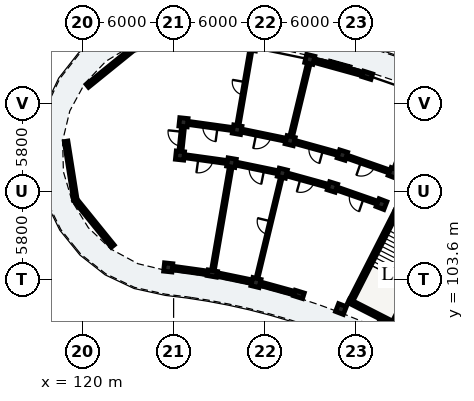
"""IFC4 building model, lengths in metres.
Left out: names, types, materials, properties, quantities, classifications, styles, units other than length and angle.
Written with IfcOpenShell. Run it as: python <this file> out.ifc"""

import sys

from ifc_helpers import new_model, si_unit, direction, frame, frame_2d, origin, origin_2d, place, context, subcontext, project, spatial, rectangle, extrude, element, fill, save


model = new_model("IFC4")
c1 = context("Model", 3, precision=1e-05, world=origin(), true_north=direction((0.0, 1.0)))
c2 = subcontext(c1, "Body", "Model", "MODEL_VIEW")
j1 = project(units=[si_unit("LENGTHUNIT", "METRE"), si_unit("PLANEANGLEUNIT", "RADIAN")], contexts=[c1])
p1 = place(None, origin())
s1 = spatial("IfcSite", under=j1, at=p1, CompositionType="ELEMENT")
p2 = place(p1, origin())
s2 = spatial("IfcBuilding", under=s1, at=p2, CompositionType="ELEMENT")
p3 = place(p2, frame((0.0, 0.0, 12.2)))
s3 = spatial("IfcBuildingStorey", under=s2, at=p3, CompositionType="ELEMENT", Elevation=12.2)
p4 = place(p3, frame((140.684, 108.139, 0.0), z_axis=(0.0, 0.0, 1.0), x_axis=(-0.453992276384, -0.891005618941, 0.0)))
e1 = element("IfcWall", 1, at=p4, inside=s3, PredefinedType="SHEAR", context=c2, shape_type="SweptSolid", body=[
    extrude(rectangle(XDim=6.6, YDim=0.25, at=frame_2d((3.3, 0.0))), origin(), (0.0, 0.0, 1.0), 3.11),
])
p5 = place(p3, frame((137.52, 102.203, 0.0), z_axis=(0.0, 0.0, 1.0), x_axis=(0.891003540237, -0.453996356025, 0.0)))
e2 = element("IfcWall", 2, at=p5, inside=s3, PredefinedType="SHEAR", context=c2, shape_type="SweptSolid", body=[
    extrude(rectangle(XDim=3.42, YDim=0.25, at=frame_2d((1.71, 0.0))), origin(), (0.0, 0.0, 1.0), 3.11),
])
p6 = place(p3, frame((143.509, 106.699, 0.0), z_axis=(0.0, 0.0, 1.0), x_axis=(-0.453992276384, -0.891005618941, 0.0)))
e3 = element("IfcWall", 3, at=p6, inside=s3, PredefinedType="SHEAR", context=c2, shape_type="SweptSolid", body=[
    extrude(rectangle(XDim=6.6, YDim=0.25, at=frame_2d((3.3, 0.0))), origin(), (0.0, 0.0, 1.0), 3.11),
])
p7 = place(p6, frame((0.22, 0.0, 0.0)))
e4 = element("IfcOpeningElement", 4, at=p7, cuts=e3, PredefinedType="OPENING", context=c2, shape_type="SweptSolid", body=[
    extrude(rectangle(XDim=1.05, YDim=2.15, at=frame_2d((0.525, 1.075))), frame((0.0, 0.135, 0.0), z_axis=(0.0, -1.0, 0.0), x_axis=(1.0, 0.0, 0.0)), (0.0, 0.0, 1.0), 0.27),
])
for number, where, z_axis, x_axis in (
    (5, (137.01, 101.667, 0.0), (0.0, 0.0, 1.0), (0.36, 0.933, 0.0)),
    (6, (139.675, 108.57, 0.0), (0.0, 0.0, 1.0), (0.36, 0.933, 0.0)),
    (7, (140.468, 110.622, 0.0), (0.0, 0.0, 1.0), (0.36, 0.933, 0.0)),
):
    element("IfcColumn", number, at=place(p3, frame(where, z_axis=z_axis, x_axis=x_axis)), inside=s3, PredefinedType="COLUMN", context=c2, shape_type="SweptSolid", body=[
        extrude(rectangle(XDim=0.55, YDim=0.55, at=origin_2d()), origin(), (0.0, 0.0, 1.0), 3.105),
    ])
p8 = place(p3, frame((134.243, 102.631, 0.0), z_axis=(0.0, 0.0, 1.0), x_axis=(0.297930225503, 0.954587649581, 0.0)))
e8 = element("IfcColumn", 8, at=p8, inside=s3, PredefinedType="PILASTER", context=c2, shape_type="SweptSolid", body=[
    extrude(rectangle(XDim=0.38, YDim=0.62, at=origin_2d()), origin(), (0.0, 0.0, 1.0), 3.105),
])
for number, where, z_axis, x_axis in (
    (9, (136.448, 109.695, 0.0), (0.0, 0.0, 1.0), (0.298, 0.955, 0.0)),
    (10, (137.103, 111.795, 0.0), (0.0, 0.0, 1.0), (0.298, 0.955, 0.0)),
):
    element("IfcColumn", number, at=place(p3, frame(where, z_axis=z_axis, x_axis=x_axis)), inside=s3, PredefinedType="COLUMN", context=c2, shape_type="SweptSolid", body=[
        extrude(rectangle(XDim=0.55, YDim=0.55, at=origin_2d()), origin(), (0.0, 0.0, 1.0), 3.105),
    ])
p9 = place(p3, frame((138.742, 117.046, 0.0), z_axis=(0.0, 0.0, 1.0), x_axis=(0.297930225503, 0.954587649581, 0.0)))
e11 = element("IfcColumn", 11, at=p9, inside=s3, PredefinedType="PILASTER", context=c2, shape_type="SweptSolid", body=[
    extrude(rectangle(XDim=0.38, YDim=0.62, at=origin_2d()), origin(), (0.0, 0.0, 1.0), 3.105),
])
for number, where, z_axis, x_axis in (
    (12, (131.418, 103.412, 0.0), (0.0, 0.0, 1.0), (0.234, 0.972, 0.0)),
    (13, (133.153, 110.606, 0.0), (0.0, 0.0, 1.0), (0.234, 0.972, 0.0)),
    (14, (133.669, 112.744, 0.0), (0.0, 0.0, 1.0), (0.234, 0.972, 0.0)),
    (15, (134.958, 118.091, 0.0), (0.0, 0.0, 1.0), (0.234, 0.972, 0.0)),
):
    element("IfcColumn", number, at=place(p3, frame(where, z_axis=z_axis, x_axis=x_axis)), inside=s3, PredefinedType="COLUMN", context=c2, shape_type="SweptSolid", body=[
        extrude(rectangle(XDim=0.55, YDim=0.55, at=origin_2d()), origin(), (0.0, 0.0, 1.0), 3.105),
    ])
p10 = place(p3, frame((128.549, 104.004, 0.0), z_axis=(0.0, 0.0, 1.0), x_axis=(0.169827230012, 0.985473851478, 0.0)))
e16 = element("IfcColumn", 16, at=p10, inside=s3, PredefinedType="PILASTER", context=c2, shape_type="SweptSolid", body=[
    extrude(rectangle(XDim=0.38, YDim=0.62, at=origin_2d()), origin(), (0.0, 0.0, 1.0), 3.105),
])
for number, where, z_axis, x_axis in (
    (17, (129.806, 111.297, 0.0), (0.0, 0.0, 1.0), (0.17, 0.985, 0.0)),
    (18, (130.179, 113.465, 0.0), (0.0, 0.0, 1.0), (0.17, 0.985, 0.0)),
    (19, (125.646, 104.406, 0.0), (0.0, 0.0, 1.0), (0.105, 0.995, 0.0)),
    (20, (126.42, 111.766, 0.0), (0.0, 0.0, 1.0), (0.105, 0.995, 0.0)),
    (21, (126.65, 113.954, 0.0), (0.0, 0.0, 1.0), (0.105, 0.995, 0.0)),
):
    element("IfcColumn", number, at=place(p3, frame(where, z_axis=z_axis, x_axis=x_axis)), inside=s3, PredefinedType="COLUMN", context=c2, shape_type="SweptSolid", body=[
        extrude(rectangle(XDim=0.55, YDim=0.55, at=origin_2d()), origin(), (0.0, 0.0, 1.0), 3.105),
    ])
p11 = place(p3, frame((138.587, 117.088, 0.0), z_axis=(0.0, 0.0, 1.0), x_axis=(-0.963894473631, 0.266284516456, 0.0)))
e22 = element("IfcWall", 22, at=p11, inside=s3, PredefinedType="SOLIDWALL", context=c2, shape_type="SweptSolid", body=[
    extrude(rectangle(XDim=3.521, YDim=0.24, at=frame_2d((1.76, 0.0))), origin(), (0.0, 0.0, 1.0), 2.355),
])
p12 = place(p11, frame((1.07, 0.0, 0.55)))
e23 = element("IfcOpeningElement", 23, at=p12, cuts=e22, PredefinedType="OPENING", context=c2, shape_type="SweptSolid", body=[
    extrude(rectangle(XDim=1.38, YDim=1.56, at=frame_2d((0.69, 0.78))), frame((0.0, 0.13, 0.0), z_axis=(0.0, -1.0, 0.0), x_axis=(1.0, 0.0, 0.0)), (0.0, 0.0, 1.0), 0.26),
])
p13 = place(p3, frame((134.089, 102.674, 0.0), z_axis=(0.0, 0.0, 1.0), x_axis=(-0.963901971286, 0.266257375017, 0.0)))
e24 = element("IfcWall", 24, at=p13, inside=s3, PredefinedType="SOLIDWALL", context=c2, shape_type="SweptSolid", body=[
    extrude(rectangle(XDim=2.525, YDim=0.24, at=frame_2d((1.263, 0.0))), origin(), (0.0, 0.0, 1.0), 2.355),
])
p14 = place(p13, frame((0.603, 0.0, 0.55)))
e25 = element("IfcOpeningElement", 25, at=p14, cuts=e24, PredefinedType="OPENING", context=c2, shape_type="SweptSolid", body=[
    extrude(rectangle(XDim=1.32, YDim=1.585, at=frame_2d((0.66, 0.792))), frame((0.0, 0.13, 0.0), z_axis=(0.0, -1.0, 0.0), x_axis=(1.0, 0.0, 0.0)), (0.0, 0.0, 1.0), 0.26),
])
p15 = place(p3, frame((131.179, 103.461, 0.0), z_axis=(0.0, 0.0, 1.0), x_axis=(-0.979353576928, 0.202154820272, 0.0)))
e26 = element("IfcWall", 26, at=p15, inside=s3, PredefinedType="SOLIDWALL", context=c2, shape_type="SweptSolid", body=[
    extrude(rectangle(XDim=2.525, YDim=0.24, at=frame_2d((1.263, 0.0))), origin(), (0.0, 0.0, 1.0), 2.355),
])
p16 = place(p15, frame((0.542, 0.0, 0.35)))
e27 = element("IfcOpeningElement", 27, at=p16, cuts=e26, PredefinedType="OPENING", context=c2, shape_type="SweptSolid", body=[
    extrude(rectangle(XDim=1.44, YDim=1.66, at=frame_2d((0.72, 0.83))), frame((0.0, 0.13, 0.0), z_axis=(0.0, -1.0, 0.0), x_axis=(1.0, 0.0, 0.0)), (0.0, 0.0, 1.0), 0.26),
])
p17 = place(p3, frame((128.39, 104.026, 0.0), z_axis=(0.0, 0.0, 1.0), x_axis=(-0.990545622952, 0.13718370476, 0.0)))
e28 = element("IfcWall", 28, at=p17, inside=s3, PredefinedType="SOLIDWALL", context=c2, shape_type="SweptSolid", body=[
    extrude(rectangle(XDim=2.525, YDim=0.24, at=frame_2d((1.263, 0.0))), origin(), (0.0, 0.0, 1.0), 2.355),
])
p18 = place(p17, frame((0.483, 0.0, 0.55)))
e29 = element("IfcOpeningElement", 29, at=p18, cuts=e28, PredefinedType="OPENING", context=c2, shape_type="SweptSolid", body=[
    extrude(rectangle(XDim=1.56, YDim=1.51, at=frame_2d((0.78, 0.755))), frame((0.0, 0.13, 0.0), z_axis=(0.0, -1.0, 0.0), x_axis=(1.0, 0.0, 0.0)), (0.0, 0.0, 1.0), 0.26),
])
p19 = place(p3, frame((121.998, 105.807, 0.0), z_axis=(0.0, 0.0, 1.0), x_axis=(-0.629331205321, 0.777137204109, 0.0)))
e30 = element("IfcWall", 30, at=p19, inside=s3, PredefinedType="SOLIDWALL", context=c2, shape_type="SweptSolid", body=[
    extrude(rectangle(XDim=3.908, YDim=0.24, at=frame_2d((1.954, 0.0))), origin(), (0.0, 0.0, 1.0), 2.355),
])
p20 = place(p3, frame((119.538, 108.844, 0.0), z_axis=(0.0, 0.0, 1.0), x_axis=(-0.15648221771, 0.987680776132, 0.0)))
e31 = element("IfcWall", 31, at=p20, inside=s3, PredefinedType="SOLIDWALL", context=c2, shape_type="SweptSolid", body=[
    extrude(rectangle(XDim=3.908, YDim=0.24, at=frame_2d((1.954, 0.0))), origin(), (0.0, 0.0, 1.0), 2.355),
])
p21 = place(p20, frame((1.029, 0.0, 0.4)))
e32 = element("IfcOpeningElement", 32, at=p21, cuts=e31, PredefinedType="OPENING", context=c2, shape_type="SweptSolid", body=[
    extrude(rectangle(XDim=1.85, YDim=1.72, at=frame_2d((0.925, 0.86))), frame((0.0, 0.13, 0.0), z_axis=(0.0, -1.0, 0.0), x_axis=(1.0, 0.0, 0.0)), (0.0, 0.0, 1.0), 0.26),
])
p22 = place(p3, frame((120.327, 116.353, 0.0), z_axis=(0.0, 0.0, 1.0), x_axis=(0.777137204109, 0.629331205321, 0.0)))
e33 = element("IfcWall", 33, at=p22, inside=s3, PredefinedType="SOLIDWALL", context=c2, shape_type="SweptSolid", body=[
    extrude(rectangle(XDim=3.908, YDim=0.24, at=frame_2d((1.954, 0.0))), origin(), (0.0, 0.0, 1.0), 2.355),
])
p23 = place(p3, frame((140.612, 110.996, 0.0), z_axis=(0.0, 0.0, 1.0), x_axis=(0.360186633854, 0.932880264982, 0.0)))
e34 = element("IfcWall", 34, at=p23, inside=s3, PredefinedType="PARTITIONING", context=c2, shape_type="SweptSolid", body=[
    extrude(rectangle(XDim=4.7, YDim=0.185, at=frame_2d((2.35, 0.0))), origin(), (0.0, 0.0, 1.0), 2.37),
])
p24 = place(p3, frame((140.137, 110.738, 0.0), z_axis=(0.0, 0.0, 1.0), x_axis=(-0.944253820929, 0.329218349522, 0.0)))
e35 = element("IfcWall", 35, at=p24, inside=s3, PredefinedType="PARTITIONING", context=c2, shape_type="SweptSolid", body=[
    extrude(rectangle(XDim=2.863, YDim=0.205, at=frame_2d((1.432, 0.0))), origin(), (0.0, 0.0, 1.0), 2.37),
])
p25 = place(p24, frame((0.957, 0.0, 0.0)))
e36 = element("IfcOpeningElement", 36, at=p25, cuts=e35, PredefinedType="OPENING", context=c2, shape_type="SweptSolid", body=[
    extrude(rectangle(XDim=0.95, YDim=2.13, at=frame_2d((0.475, 1.065))), frame((0.0, 0.113, 0.0), z_axis=(0.0, -1.0, 0.0), x_axis=(1.0, 0.0, 0.0)), (0.0, 0.0, 1.0), 0.225),
])
p26 = place(p3, frame((139.345, 108.685, 0.0), z_axis=(0.0, 0.0, 1.0), x_axis=(-0.944265123647, 0.329185929627, 0.0)))
e37 = element("IfcWall", 37, at=p26, inside=s3, PredefinedType="PARTITIONING", context=c2, shape_type="SweptSolid", body=[
    extrude(rectangle(XDim=2.718, YDim=0.205, at=frame_2d((1.359, 0.0))), origin(), (0.0, 0.0, 1.0), 2.37),
])
p27 = place(p26, frame((0.884, 0.0, 0.0)))
e38 = element("IfcOpeningElement", 38, at=p27, cuts=e37, PredefinedType="OPENING", context=c2, shape_type="SweptSolid", body=[
    extrude(rectangle(XDim=0.95, YDim=2.13, at=frame_2d((0.475, 1.065))), frame((0.0, 0.113, 0.0), z_axis=(0.0, -1.0, 0.0), x_axis=(1.0, 0.0, 0.0)), (0.0, 0.0, 1.0), 0.225),
])
p28 = place(p3, frame((136.766, 111.889, 0.0), z_axis=(0.0, 0.0, 1.0), x_axis=(-0.963890789093, 0.266297853356, 0.0)))
e39 = element("IfcWall", 39, at=p28, inside=s3, PredefinedType="PARTITIONING", context=c2, shape_type="SweptSolid", body=[
    extrude(rectangle(XDim=2.863, YDim=0.205, at=frame_2d((1.432, 0.0))), origin(), (0.0, 0.0, 1.0), 2.37),
])
p29 = place(p28, frame((0.967, 0.0, 0.0)))
e40 = element("IfcOpeningElement", 40, at=p29, cuts=e39, PredefinedType="OPENING", context=c2, shape_type="SweptSolid", body=[
    extrude(rectangle(XDim=0.93, YDim=2.12, at=frame_2d((0.465, 1.06))), frame((0.0, 0.113, 0.0), z_axis=(0.0, -1.0, 0.0), x_axis=(1.0, 0.0, 0.0)), (0.0, 0.0, 1.0), 0.225),
])
p30 = place(p3, frame((136.11, 109.789, 0.0), z_axis=(0.0, 0.0, 1.0), x_axis=(-0.96388375821, 0.266323301006, 0.0)))
e41 = element("IfcWall", 41, at=p30, inside=s3, PredefinedType="PARTITIONING", context=c2, shape_type="SweptSolid", body=[
    extrude(rectangle(XDim=2.718, YDim=0.205, at=frame_2d((1.359, 0.0))), origin(), (0.0, 0.0, 1.0), 2.37),
])
p31 = place(p30, frame((0.894, 0.0, 0.0)))
e42 = element("IfcOpeningElement", 42, at=p31, cuts=e41, PredefinedType="OPENING", context=c2, shape_type="SweptSolid", body=[
    extrude(rectangle(XDim=0.93, YDim=2.12, at=frame_2d((0.465, 1.06))), frame((0.0, 0.113, 0.0), z_axis=(0.0, -1.0, 0.0), x_axis=(1.0, 0.0, 0.0)), (0.0, 0.0, 1.0), 0.225),
])
p32 = place(p3, frame((133.762, 113.133, 0.0), z_axis=(0.0, 0.0, 1.0), x_axis=(0.234386624934, 0.972143461662, 0.0)))
e43 = element("IfcWall", 43, at=p32, inside=s3, PredefinedType="PARTITIONING", context=c2, shape_type="SweptSolid", body=[
    extrude(rectangle(XDim=4.7, YDim=0.185, at=frame_2d((2.35, 0.0))), origin(), (0.0, 0.0, 1.0), 2.37),
])
p33 = place(p3, frame((131.512, 103.801, 0.0), z_axis=(0.0, 0.0, 1.0), x_axis=(0.234406698576, 0.972138621629, 0.0)))
e44 = element("IfcWall", 44, at=p33, inside=s3, PredefinedType="PARTITIONING", context=c2, shape_type="SweptSolid", body=[
    extrude(rectangle(XDim=6.6, YDim=0.125, at=frame_2d((3.3, 0.0))), origin(), (0.0, 0.0, 1.0), 2.37),
])
p34 = place(p33, frame((2.855, 0.0, 0.0)))
e45 = element("IfcOpeningElement", 45, at=p34, cuts=e44, PredefinedType="OPENING", context=c2, shape_type="SweptSolid", body=[
    extrude(rectangle(XDim=0.89, YDim=2.1, at=frame_2d((0.445, 1.05))), frame((0.0, 0.073, 0.0), z_axis=(0.0, -1.0, 0.0), x_axis=(1.0, 0.0, 0.0)), (0.0, 0.0, 1.0), 0.145),
])
p35 = place(p3, frame((133.326, 112.815, 0.0), z_axis=(0.0, 0.0, 1.0), x_axis=(-0.979348418612, 0.202179808492, 0.0)))
e46 = element("IfcWall", 46, at=p35, inside=s3, PredefinedType="PARTITIONING", context=c2, shape_type="SweptSolid", body=[
    extrude(rectangle(XDim=2.863, YDim=0.205, at=frame_2d((1.432, 0.0))), origin(), (0.0, 0.0, 1.0), 2.37),
])
p36 = place(p35, frame((0.937, 0.0, 0.0)))
e47 = element("IfcOpeningElement", 47, at=p36, cuts=e46, PredefinedType="OPENING", context=c2, shape_type="SweptSolid", body=[
    extrude(rectangle(XDim=0.99, YDim=2.16, at=frame_2d((0.495, 1.08))), frame((0.0, 0.113, 0.0), z_axis=(0.0, -1.0, 0.0), x_axis=(1.0, 0.0, 0.0)), (0.0, 0.0, 1.0), 0.225),
])
p37 = place(p3, frame((132.81, 110.677, 0.0), z_axis=(0.0, 0.0, 1.0), x_axis=(-0.979349423541, 0.202174940608, 0.0)))
e48 = element("IfcWall", 48, at=p37, inside=s3, PredefinedType="PARTITIONING", context=c2, shape_type="SweptSolid", body=[
    extrude(rectangle(XDim=2.718, YDim=0.205, at=frame_2d((1.359, 0.0))), origin(), (0.0, 0.0, 1.0), 2.37),
])
p38 = place(p37, frame((0.864, 0.0, 0.0)))
e49 = element("IfcOpeningElement", 49, at=p38, cuts=e48, PredefinedType="OPENING", context=c2, shape_type="SweptSolid", body=[
    extrude(rectangle(XDim=0.99, YDim=2.16, at=frame_2d((0.495, 1.08))), frame((0.0, 0.113, 0.0), z_axis=(0.0, -1.0, 0.0), x_axis=(1.0, 0.0, 0.0)), (0.0, 0.0, 1.0), 0.225),
])
p39 = place(p3, frame((130.247, 113.859, 0.0), z_axis=(0.0, 0.0, 1.0), x_axis=(0.169812980219, 0.985476307046, 0.0)))
e50 = element("IfcWall", 50, at=p39, inside=s3, PredefinedType="PLUMBINGWALL", context=c2, shape_type="SweptSolid", body=[
    extrude(rectangle(XDim=4.7, YDim=0.15, at=frame_2d((2.35, 0.0))), origin(), (0.0, 0.0, 1.0), 2.37),
])
p40 = place(p39, frame((1.92, 0.0, 0.0)))
e51 = element("IfcOpeningElement", 51, at=p40, cuts=e50, PredefinedType="OPENING", context=c2, shape_type="SweptSolid", body=[
    extrude(rectangle(XDim=0.86, YDim=2.06, at=frame_2d((0.43, 1.03))), frame((0.0, 0.085, 0.0), z_axis=(0.0, -1.0, 0.0), x_axis=(1.0, 0.0, 0.0)), (0.0, 0.0, 1.0), 0.17),
])
p41 = place(p3, frame((128.617, 104.398, 0.0), z_axis=(0.0, 0.0, 1.0), x_axis=(0.169825160084, 0.985474208187, 0.0)))
e52 = element("IfcWall", 52, at=p41, inside=s3, PredefinedType="PARTITIONING", context=c2, shape_type="SweptSolid", body=[
    extrude(rectangle(XDim=6.6, YDim=0.185, at=frame_2d((3.3, 0.0))), origin(), (0.0, 0.0, 1.0), 2.37),
])
p42 = place(p3, frame((129.833, 113.513, 0.0), z_axis=(0.0, 0.0, 1.0), x_axis=(-0.990544162976, 0.137194246211, 0.0)))
e53 = element("IfcWall", 53, at=p42, inside=s3, PredefinedType="PARTITIONING", context=c2, shape_type="SweptSolid", body=[
    extrude(rectangle(XDim=2.863, YDim=0.205, at=frame_2d((1.432, 0.0))), origin(), (0.0, 0.0, 1.0), 2.37),
])
p43 = place(p42, frame((0.947, 0.0, 0.0)))
e54 = element("IfcOpeningElement", 54, at=p43, cuts=e53, PredefinedType="OPENING", context=c2, shape_type="SweptSolid", body=[
    extrude(rectangle(XDim=0.97, YDim=2.15, at=frame_2d((0.485, 1.075))), frame((0.0, 0.113, 0.0), z_axis=(0.0, -1.0, 0.0), x_axis=(1.0, 0.0, 0.0)), (0.0, 0.0, 1.0), 0.225),
])
p44 = place(p3, frame((129.459, 111.345, 0.0), z_axis=(0.0, 0.0, 1.0), x_axis=(-0.990535404475, 0.137257467855, 0.0)))
e55 = element("IfcWall", 55, at=p44, inside=s3, PredefinedType="PARTITIONING", context=c2, shape_type="SweptSolid", body=[
    extrude(rectangle(XDim=2.718, YDim=0.205, at=frame_2d((1.359, 0.0))), origin(), (0.0, 0.0, 1.0), 2.37),
])
p45 = place(p44, frame((0.874, 0.0, 0.0)))
e56 = element("IfcOpeningElement", 56, at=p45, cuts=e55, PredefinedType="OPENING", context=c2, shape_type="SweptSolid", body=[
    extrude(rectangle(XDim=0.97, YDim=2.15, at=frame_2d((0.485, 1.075))), frame((0.0, 0.113, 0.0), z_axis=(0.0, -1.0, 0.0), x_axis=(1.0, 0.0, 0.0)), (0.0, 0.0, 1.0), 0.225),
])
p46 = place(p3, frame((126.425, 111.816, 0.0), z_axis=(0.0, 0.0, 1.0), x_axis=(0.104509292252, 0.994523910136, 0.0)))
e57 = element("IfcWall", 57, at=p46, inside=s3, PredefinedType="PARTITIONING", context=c2, shape_type="SweptSolid", body=[
    extrude(rectangle(XDim=2.1, YDim=0.205, at=frame_2d((1.05, 0.0))), origin(), (0.0, 0.0, 1.0), 2.37),
])
p47 = place(p46, frame((0.57, 0.0, 0.0)))
e58 = element("IfcOpeningElement", 58, at=p47, cuts=e57, PredefinedType="OPENING", context=c2, shape_type="SweptSolid", body=[
    extrude(rectangle(XDim=0.95, YDim=2.13, at=frame_2d((0.475, 1.065))), frame((0.0, 0.113, 0.0), z_axis=(0.0, -1.0, 0.0), x_axis=(1.0, 0.0, 0.0)), (0.0, 0.0, 1.0), 0.225),
])
p48 = place(p12, origin())
e59 = element("IfcWindow", 59, at=p48, inside=s3, PartitioningType="SINGLE_PANEL", PredefinedType="WINDOW", context=c2, shape_type="SweptSolid", body=[
    extrude(rectangle(XDim=1.38, YDim=1.56, at=frame_2d((0.69, 0.78))), frame((0.0, 0.03, 0.0), z_axis=(0.0, -1.0, 0.0), x_axis=(1.0, 0.0, 0.0)), (0.0, 0.0, 1.0), 0.06),
])
fill(e23, e59)
p49 = place(p14, origin())
e60 = element("IfcWindow", 60, at=p49, inside=s3, PartitioningType="SINGLE_PANEL", PredefinedType="WINDOW", context=c2, shape_type="SweptSolid", body=[
    extrude(rectangle(XDim=1.32, YDim=1.585, at=frame_2d((0.66, 0.792))), frame((0.0, 0.03, 0.0), z_axis=(0.0, -1.0, 0.0), x_axis=(1.0, 0.0, 0.0)), (0.0, 0.0, 1.0), 0.06),
])
fill(e25, e60)
p50 = place(p16, origin())
e61 = element("IfcWindow", 61, at=p50, inside=s3, PartitioningType="SINGLE_PANEL", PredefinedType="WINDOW", context=c2, shape_type="SweptSolid", body=[
    extrude(rectangle(XDim=1.44, YDim=1.66, at=frame_2d((0.72, 0.83))), frame((0.0, 0.03, 0.0), z_axis=(0.0, -1.0, 0.0), x_axis=(1.0, 0.0, 0.0)), (0.0, 0.0, 1.0), 0.06),
])
fill(e27, e61)
p51 = place(p18, origin())
e62 = element("IfcWindow", 62, at=p51, inside=s3, PartitioningType="SINGLE_PANEL", PredefinedType="WINDOW", context=c2, shape_type="SweptSolid", body=[
    extrude(rectangle(XDim=1.56, YDim=1.51, at=frame_2d((0.78, 0.755))), frame((0.0, 0.03, 0.0), z_axis=(0.0, -1.0, 0.0), x_axis=(1.0, 0.0, 0.0)), (0.0, 0.0, 1.0), 0.06),
])
fill(e29, e62)
p52 = place(p21, origin())
e63 = element("IfcWindow", 63, at=p52, inside=s3, PartitioningType="SINGLE_PANEL", PredefinedType="WINDOW", context=c2, shape_type="SweptSolid", body=[
    extrude(rectangle(XDim=1.85, YDim=1.72, at=frame_2d((0.925, 0.86))), frame((0.0, 0.03, 0.0), z_axis=(0.0, -1.0, 0.0), x_axis=(1.0, 0.0, 0.0)), (0.0, 0.0, 1.0), 0.06),
])
fill(e32, e63)
p53 = place(p25, origin())
e64 = element("IfcDoor", 64, at=p53, inside=s3, OperationType="SINGLE_SWING_RIGHT", PredefinedType="DOOR", context=c2, shape_type="SweptSolid", body=[
    extrude(rectangle(XDim=0.95, YDim=2.13, at=frame_2d((0.475, 1.065))), frame((0.0, 0.025, 0.0), z_axis=(0.0, -1.0, 0.0), x_axis=(1.0, 0.0, 0.0)), (0.0, 0.0, 1.0), 0.05),
])
fill(e36, e64)
p54 = place(p27, origin())
e65 = element("IfcDoor", 65, at=p54, inside=s3, OperationType="SINGLE_SWING_LEFT", PredefinedType="DOOR", context=c2, shape_type="SweptSolid", body=[
    extrude(rectangle(XDim=0.95, YDim=2.13, at=frame_2d((0.475, 1.065))), frame((0.0, 0.025, 0.0), z_axis=(0.0, -1.0, 0.0), x_axis=(1.0, 0.0, 0.0)), (0.0, 0.0, 1.0), 0.05),
])
fill(e38, e65)
p55 = place(p29, origin())
e66 = element("IfcDoor", 66, at=p55, inside=s3, OperationType="SINGLE_SWING_LEFT", PredefinedType="DOOR", context=c2, shape_type="SweptSolid", body=[
    extrude(rectangle(XDim=0.93, YDim=2.12, at=frame_2d((0.465, 1.06))), frame((0.0, 0.025, 0.0), z_axis=(0.0, -1.0, 0.0), x_axis=(1.0, 0.0, 0.0)), (0.0, 0.0, 1.0), 0.05),
])
fill(e40, e66)
p56 = place(p31, origin())
e67 = element("IfcDoor", 67, at=p56, inside=s3, OperationType="SINGLE_SWING_RIGHT", PredefinedType="DOOR", context=c2, shape_type="SweptSolid", body=[
    extrude(rectangle(XDim=0.93, YDim=2.12, at=frame_2d((0.465, 1.06))), frame((0.0, 0.025, 0.0), z_axis=(0.0, -1.0, 0.0), x_axis=(1.0, 0.0, 0.0)), (0.0, 0.0, 1.0), 0.05),
])
fill(e42, e67)
p57 = place(p34, origin())
e68 = element("IfcDoor", 68, at=p57, inside=s3, OperationType="SINGLE_SWING_RIGHT", PredefinedType="DOOR", context=c2, shape_type="SweptSolid", body=[
    extrude(rectangle(XDim=0.89, YDim=2.1, at=frame_2d((0.445, 1.05))), frame((0.0, 0.025, 0.0), z_axis=(0.0, -1.0, 0.0), x_axis=(1.0, 0.0, 0.0)), (0.0, 0.0, 1.0), 0.05),
])
fill(e45, e68)
p58 = place(p36, origin())
e69 = element("IfcDoor", 69, at=p58, inside=s3, OperationType="SINGLE_SWING_RIGHT", PredefinedType="DOOR", context=c2, shape_type="SweptSolid", body=[
    extrude(rectangle(XDim=0.99, YDim=2.16, at=frame_2d((0.495, 1.08))), frame((0.0, 0.025, 0.0), z_axis=(0.0, -1.0, 0.0), x_axis=(1.0, 0.0, 0.0)), (0.0, 0.0, 1.0), 0.05),
])
fill(e47, e69)
p59 = place(p38, origin())
e70 = element("IfcDoor", 70, at=p59, inside=s3, OperationType="SINGLE_SWING_LEFT", PredefinedType="DOOR", context=c2, shape_type="SweptSolid", body=[
    extrude(rectangle(XDim=0.99, YDim=2.16, at=frame_2d((0.495, 1.08))), frame((0.0, 0.025, 0.0), z_axis=(0.0, -1.0, 0.0), x_axis=(1.0, 0.0, 0.0)), (0.0, 0.0, 1.0), 0.05),
])
fill(e49, e70)
p60 = place(p40, origin())
e71 = element("IfcDoor", 71, at=p60, inside=s3, OperationType="SINGLE_SWING_RIGHT", PredefinedType="DOOR", context=c2, shape_type="SweptSolid", body=[
    extrude(rectangle(XDim=0.86, YDim=2.06, at=frame_2d((0.43, 1.03))), frame((0.0, 0.025, 0.0), z_axis=(0.0, -1.0, 0.0), x_axis=(1.0, 0.0, 0.0)), (0.0, 0.0, 1.0), 0.05),
])
fill(e51, e71)
p61 = place(p43, origin())
e72 = element("IfcDoor", 72, at=p61, inside=s3, OperationType="SINGLE_SWING_LEFT", PredefinedType="DOOR", context=c2, shape_type="SweptSolid", body=[
    extrude(rectangle(XDim=0.97, YDim=2.15, at=frame_2d((0.485, 1.075))), frame((0.0, 0.025, 0.0), z_axis=(0.0, -1.0, 0.0), x_axis=(1.0, 0.0, 0.0)), (0.0, 0.0, 1.0), 0.05),
])
fill(e54, e72)
p62 = place(p45, origin())
e73 = element("IfcDoor", 73, at=p62, inside=s3, OperationType="SINGLE_SWING_RIGHT", PredefinedType="DOOR", context=c2, shape_type="SweptSolid", body=[
    extrude(rectangle(XDim=0.97, YDim=2.15, at=frame_2d((0.485, 1.075))), frame((0.0, 0.025, 0.0), z_axis=(0.0, -1.0, 0.0), x_axis=(1.0, 0.0, 0.0)), (0.0, 0.0, 1.0), 0.05),
])
fill(e56, e73)
p63 = place(p47, origin())
e74 = element("IfcDoor", 74, at=p63, inside=s3, OperationType="SINGLE_SWING_RIGHT", PredefinedType="DOOR", context=c2, shape_type="SweptSolid", body=[
    extrude(rectangle(XDim=0.95, YDim=2.13, at=frame_2d((0.475, 1.065))), frame((0.0, 0.025, 0.0), z_axis=(0.0, -1.0, 0.0), x_axis=(1.0, 0.0, 0.0)), (0.0, 0.0, 1.0), 0.05),
])
fill(e58, e74)
save(model, sys.argv[1])
